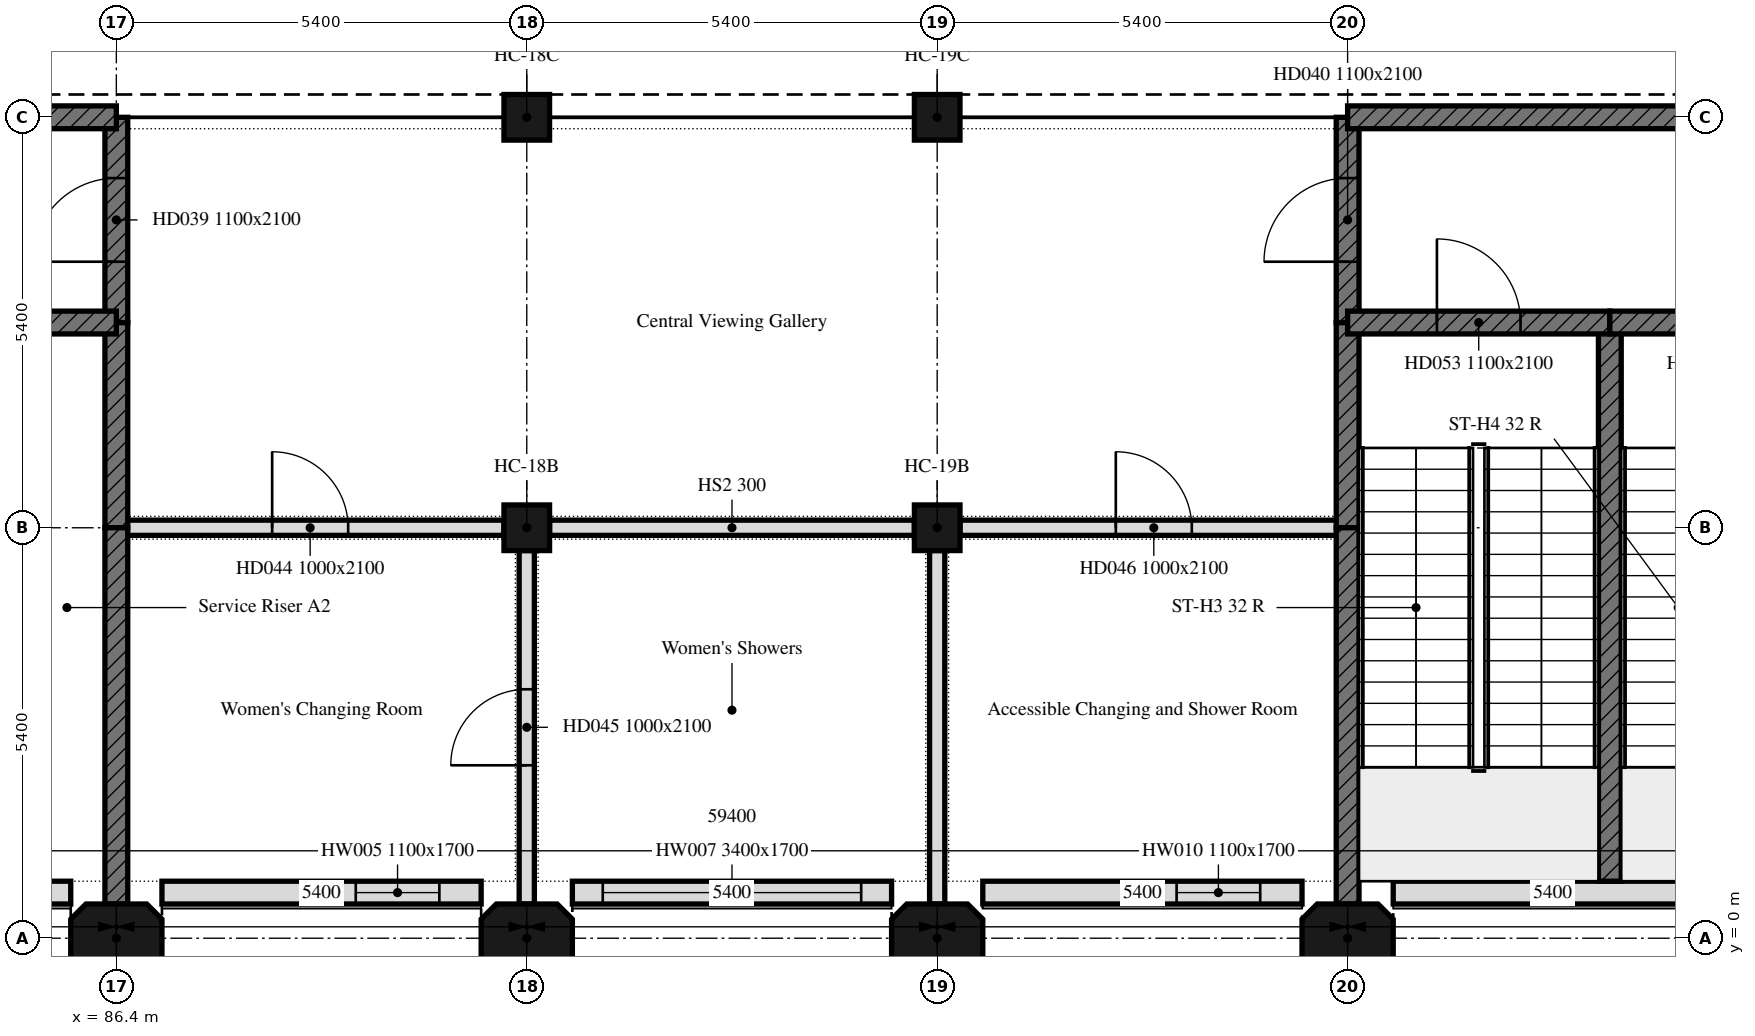
"""IFC4 building model, lengths in metres.
Left out: names, types, materials, properties, quantities, classifications, styles, units other than length and angle.
Written with IfcOpenShell. Run it as: python <this file> out.ifc"""

import sys

from ifc_helpers import new_model, si_unit, direction, frame, frame_2d, origin, origin_2d, place, context, subcontext, project, spatial, polyline, rectangle, outline, extrude, element, fill, save


model = new_model("IFC4")
c1 = context("Model", 3, precision=1e-05, world=origin(), true_north=direction((0.0, 1.0)))
c2 = subcontext(c1, "Body", "Model", "MODEL_VIEW")
j1 = project(units=[si_unit("LENGTHUNIT", "METRE"), si_unit("PLANEANGLEUNIT", "RADIAN")], contexts=[c1])
p1 = place(None, origin())
s1 = spatial("IfcSite", under=j1, at=p1, CompositionType="ELEMENT")
p2 = place(p1, origin())
s2 = spatial("IfcBuilding", under=s1, at=p2, CompositionType="ELEMENT")
p3 = place(p2, frame((0.0, 0.0, 8.4)))
s3 = spatial("IfcBuildingStorey", under=s2, at=p3, CompositionType="ELEMENT", Elevation=8.4)
for number, where, z_axis, x_axis in (
    (1, (86.4, 0.0, 0.0), (0.0, 0.0, 1.0), (1.0, 0.0, 0.0)),
    (2, (91.8, 0.0, 0.0), (0.0, 0.0, 1.0), (1.0, 0.0, 0.0)),
):
    element("IfcColumn", number, at=place(p3, frame(where, z_axis=z_axis, x_axis=x_axis)), inside=s3, PredefinedType="COLUMN", context=c2, shape_type="SweptSolid", body=[
        extrude(outline(polyline([(-0.4, -0.45), (0.4, -0.45), (0.6, -0.25), (0.6, 0.25), (0.4, 0.45), (-0.4, 0.45), (-0.6, 0.25), (-0.6, -0.25), (-0.4, -0.45)])), origin(), (0.0, 0.0, 1.0), 5.7),
    ])
for number, where, z_axis, x_axis in (
    (3, (91.8, 5.4, 0.0), (0.0, 0.0, 1.0), (1.0, 0.0, 0.0)),
    (4, (91.8, 10.8, 0.0), (0.0, 0.0, 1.0), (1.0, 0.0, 0.0)),
):
    element("IfcColumn", number, at=place(p3, frame(where, z_axis=z_axis, x_axis=x_axis)), inside=s3, PredefinedType="COLUMN", context=c2, shape_type="SweptSolid", body=[
        extrude(rectangle(XDim=0.6, YDim=0.6, at=origin_2d()), origin(), (0.0, 0.0, 1.0), 5.7),
    ])
p4 = place(p3, frame((97.2, 0.0, 0.0), z_axis=(0.0, 0.0, 1.0), x_axis=(1.0, 0.0, 0.0)))
e5 = element("IfcColumn", 5, at=p4, inside=s3, PredefinedType="COLUMN", context=c2, shape_type="SweptSolid", body=[
    extrude(outline(polyline([(-0.4, -0.45), (0.4, -0.45), (0.6, -0.25), (0.6, 0.25), (0.4, 0.45), (-0.4, 0.45), (-0.6, 0.25), (-0.6, -0.25), (-0.4, -0.45)])), origin(), (0.0, 0.0, 1.0), 5.7),
])
for number, where, z_axis, x_axis in (
    (6, (97.2, 5.4, 0.0), (0.0, 0.0, 1.0), (1.0, 0.0, 0.0)),
    (7, (97.2, 10.8, 0.0), (0.0, 0.0, 1.0), (1.0, 0.0, 0.0)),
):
    element("IfcColumn", number, at=place(p3, frame(where, z_axis=z_axis, x_axis=x_axis)), inside=s3, PredefinedType="COLUMN", context=c2, shape_type="SweptSolid", body=[
        extrude(rectangle(XDim=0.6, YDim=0.6, at=origin_2d()), origin(), (0.0, 0.0, 1.0), 5.7),
    ])
p5 = place(p3, frame((102.6, 0.0, 0.0), z_axis=(0.0, 0.0, 1.0), x_axis=(1.0, 0.0, 0.0)))
e8 = element("IfcColumn", 8, at=p5, inside=s3, PredefinedType="COLUMN", context=c2, shape_type="SweptSolid", body=[
    extrude(outline(polyline([(-0.4, -0.45), (0.4, -0.45), (0.6, -0.25), (0.6, 0.25), (0.4, 0.45), (-0.4, 0.45), (-0.6, 0.25), (-0.6, -0.25), (-0.4, -0.45)])), origin(), (0.0, 0.0, 1.0), 5.7),
])
p6 = place(p3, frame((81.6, 0.6, 0.0), z_axis=(0.0, 0.0, 1.0), x_axis=(1.0, 0.0, 0.0)))
e9 = element("IfcWall", 9, at=p6, inside=s3, PredefinedType="SOLIDWALL", context=c2, shape_type="SweptSolid", body=[
    extrude(rectangle(XDim=4.2, YDim=0.3, at=frame_2d((2.1, 0.0))), origin(), (0.0, 0.0, 1.0), 5.7),
])
p7 = place(p3, frame((87.0, 0.6, 0.0), z_axis=(0.0, 0.0, 1.0), x_axis=(1.0, 0.0, 0.0)))
e10 = element("IfcWall", 10, at=p7, inside=s3, PredefinedType="SOLIDWALL", context=c2, shape_type="SweptSolid", body=[
    extrude(rectangle(XDim=4.2, YDim=0.3, at=frame_2d((2.1, 0.0))), origin(), (0.0, 0.0, 1.0), 5.7),
])
p8 = place(p7, frame((2.55, 0.0, 0.9)))
e11 = element("IfcOpeningElement", 11, at=p8, cuts=e10, PredefinedType="OPENING", context=c2, shape_type="SweptSolid", body=[
    extrude(rectangle(XDim=1.1, YDim=1.7, at=frame_2d((0.55, 0.85))), frame((0.0, 0.15, 0.0), z_axis=(0.0, -1.0, 0.0), x_axis=(1.0, 0.0, 0.0)), (0.0, 0.0, 1.0), 0.3),
])
p9 = place(p3, frame((92.4, 0.6, 0.0), z_axis=(0.0, 0.0, 1.0), x_axis=(1.0, 0.0, 0.0)))
e12 = element("IfcWall", 12, at=p9, inside=s3, PredefinedType="SOLIDWALL", context=c2, shape_type="SweptSolid", body=[
    extrude(rectangle(XDim=4.2, YDim=0.3, at=frame_2d((2.1, 0.0))), origin(), (0.0, 0.0, 1.0), 5.7),
])
p10 = place(p9, frame((0.4, 0.0, 0.9)))
e13 = element("IfcOpeningElement", 13, at=p10, cuts=e12, PredefinedType="OPENING", context=c2, shape_type="SweptSolid", body=[
    extrude(rectangle(XDim=3.4, YDim=1.7, at=frame_2d((1.7, 0.85))), frame((0.0, 0.15, 0.0), z_axis=(0.0, -1.0, 0.0), x_axis=(1.0, 0.0, 0.0)), (0.0, 0.0, 1.0), 0.3),
])
p11 = place(p3, frame((97.8, 0.6, 0.0), z_axis=(0.0, 0.0, 1.0), x_axis=(1.0, 0.0, 0.0)))
e14 = element("IfcWall", 14, at=p11, inside=s3, PredefinedType="SOLIDWALL", context=c2, shape_type="SweptSolid", body=[
    extrude(rectangle(XDim=4.2, YDim=0.3, at=frame_2d((2.1, 0.0))), origin(), (0.0, 0.0, 1.0), 5.7),
])
p12 = place(p11, frame((2.55, 0.0, 0.9)))
e15 = element("IfcOpeningElement", 15, at=p12, cuts=e14, PredefinedType="OPENING", context=c2, shape_type="SweptSolid", body=[
    extrude(rectangle(XDim=1.1, YDim=1.7, at=frame_2d((0.55, 0.85))), frame((0.0, 0.15, 0.0), z_axis=(0.0, -1.0, 0.0), x_axis=(1.0, 0.0, 0.0)), (0.0, 0.0, 1.0), 0.3),
])
p13 = place(p3, frame((103.2, 0.6, 0.0), z_axis=(0.0, 0.0, 1.0), x_axis=(1.0, 0.0, 0.0)))
e16 = element("IfcWall", 16, at=p13, inside=s3, PredefinedType="SOLIDWALL", context=c2, shape_type="SweptSolid", body=[
    extrude(rectangle(XDim=4.2, YDim=0.3, at=frame_2d((2.1, 0.0))), origin(), (0.0, 0.0, 1.0), 5.7),
])
p14 = place(p3, frame((86.4, 5.4, 0.0), z_axis=(0.0, 0.0, 1.0), x_axis=(1.0, 0.0, 0.0)))
e17 = element("IfcWall", 17, at=p14, inside=s3, PredefinedType="PARTITIONING", context=c2, shape_type="SweptSolid", body=[
    extrude(rectangle(XDim=5.1, YDim=0.2, at=frame_2d((2.55, 0.0))), origin(), (0.0, 0.0, 1.0), 5.7),
])
p15 = place(p14, frame((2.05, 0.0, 0.0)))
e18 = element("IfcOpeningElement", 18, at=p15, cuts=e17, PredefinedType="OPENING", context=c2, shape_type="SweptSolid", body=[
    extrude(rectangle(XDim=1.0, YDim=2.1, at=frame_2d((0.5, 1.05))), frame((0.0, 0.1, 0.0), z_axis=(0.0, -1.0, 0.0), x_axis=(1.0, 0.0, 0.0)), (0.0, 0.0, 1.0), 0.2),
])
p16 = place(p3, frame((92.1, 5.4, 0.0), z_axis=(0.0, 0.0, 1.0), x_axis=(1.0, 0.0, 0.0)))
e19 = element("IfcWall", 19, at=p16, inside=s3, PredefinedType="PARTITIONING", context=c2, shape_type="SweptSolid", body=[
    extrude(rectangle(XDim=4.8, YDim=0.2, at=frame_2d((2.4, 0.0))), origin(), (0.0, 0.0, 1.0), 5.7),
])
p17 = place(p3, frame((97.5, 5.4, 0.0), z_axis=(0.0, 0.0, 1.0), x_axis=(1.0, 0.0, 0.0)))
e20 = element("IfcWall", 20, at=p17, inside=s3, PredefinedType="PARTITIONING", context=c2, shape_type="SweptSolid", body=[
    extrude(rectangle(XDim=5.1, YDim=0.2, at=frame_2d((2.55, 0.0))), origin(), (0.0, 0.0, 1.0), 5.7),
])
p18 = place(p17, frame((2.05, 0.0, 0.0)))
e21 = element("IfcOpeningElement", 21, at=p18, cuts=e20, PredefinedType="OPENING", context=c2, shape_type="SweptSolid", body=[
    extrude(rectangle(XDim=1.0, YDim=2.1, at=frame_2d((0.5, 1.05))), frame((0.0, 0.1, 0.0), z_axis=(0.0, -1.0, 0.0), x_axis=(1.0, 0.0, 0.0)), (0.0, 0.0, 1.0), 0.2),
])
p19 = place(p3, frame((86.4, 5.4, 0.0), z_axis=(0.0, 0.0, 1.0), x_axis=(0.0, 1.0, 0.0)))
e22 = element("IfcWall", 22, at=p19, inside=s3, PredefinedType="SHEAR", context=c2, shape_type="SweptSolid", body=[
    extrude(rectangle(XDim=2.7, YDim=0.3, at=frame_2d((1.35, 0.0))), origin(), (0.0, 0.0, 1.0), 5.7),
])
p20 = place(p3, frame((86.4, 8.1, 0.0), z_axis=(0.0, 0.0, 1.0), x_axis=(0.0, 1.0, 0.0)))
e23 = element("IfcWall", 23, at=p20, inside=s3, PredefinedType="SHEAR", context=c2, shape_type="SweptSolid", body=[
    extrude(rectangle(XDim=2.7, YDim=0.3, at=frame_2d((1.35, 0.0))), origin(), (0.0, 0.0, 1.0), 5.7),
])
p21 = place(p20, frame((0.8, 0.0, 0.0)))
e24 = element("IfcOpeningElement", 24, at=p21, cuts=e23, PredefinedType="OPENING", context=c2, shape_type="SweptSolid", body=[
    extrude(rectangle(XDim=1.1, YDim=2.1, at=frame_2d((0.55, 1.05))), frame((0.0, 0.15, 0.0), z_axis=(0.0, -1.0, 0.0), x_axis=(1.0, 0.0, 0.0)), (0.0, 0.0, 1.0), 0.3),
])
p22 = place(p3, frame((102.6, 5.4, 0.0), z_axis=(0.0, 0.0, 1.0), x_axis=(0.0, 1.0, 0.0)))
e25 = element("IfcWall", 25, at=p22, inside=s3, PredefinedType="SHEAR", context=c2, shape_type="SweptSolid", body=[
    extrude(rectangle(XDim=2.7, YDim=0.3, at=frame_2d((1.35, 0.0))), origin(), (0.0, 0.0, 1.0), 5.7),
])
p23 = place(p3, frame((102.6, 8.1, 0.0), z_axis=(0.0, 0.0, 1.0), x_axis=(0.0, 1.0, 0.0)))
e26 = element("IfcWall", 26, at=p23, inside=s3, PredefinedType="SHEAR", context=c2, shape_type="SweptSolid", body=[
    extrude(rectangle(XDim=2.7, YDim=0.3, at=frame_2d((1.35, 0.0))), origin(), (0.0, 0.0, 1.0), 5.7),
])
p24 = place(p23, frame((0.8, 0.0, 0.0)))
e27 = element("IfcOpeningElement", 27, at=p24, cuts=e26, PredefinedType="OPENING", context=c2, shape_type="SweptSolid", body=[
    extrude(rectangle(XDim=1.1, YDim=2.1, at=frame_2d((0.55, 1.05))), frame((0.0, 0.15, 0.0), z_axis=(0.0, -1.0, 0.0), x_axis=(1.0, 0.0, 0.0)), (0.0, 0.0, 1.0), 0.3),
])
p25 = place(p3, frame((91.8, 0.45, 0.0), z_axis=(0.0, 0.0, 1.0), x_axis=(0.0, 1.0, 0.0)))
e28 = element("IfcWall", 28, at=p25, inside=s3, PredefinedType="PARTITIONING", context=c2, shape_type="SweptSolid", body=[
    extrude(rectangle(XDim=4.65, YDim=0.2, at=frame_2d((2.325, 0.0))), origin(), (0.0, 0.0, 1.0), 5.7),
])
p26 = place(p25, frame((1.825, 0.0, 0.0)))
e29 = element("IfcOpeningElement", 29, at=p26, cuts=e28, PredefinedType="OPENING", context=c2, shape_type="SweptSolid", body=[
    extrude(rectangle(XDim=1.0, YDim=2.1, at=frame_2d((0.5, 1.05))), frame((0.0, 0.1, 0.0), z_axis=(0.0, -1.0, 0.0), x_axis=(1.0, 0.0, 0.0)), (0.0, 0.0, 1.0), 0.2),
])
p27 = place(p3, frame((86.4, 0.45, 0.0), z_axis=(0.0, 0.0, 1.0), x_axis=(0.0, 1.0, 0.0)))
e30 = element("IfcWall", 30, at=p27, inside=s3, PredefinedType="SHEAR", context=c2, shape_type="SweptSolid", body=[
    extrude(rectangle(XDim=4.95, YDim=0.3, at=frame_2d((2.475, 0.0))), origin(), (0.0, 0.0, 1.0), 5.7),
])
p28 = place(p3, frame((97.2, 0.45, 0.0), z_axis=(0.0, 0.0, 1.0), x_axis=(0.0, 1.0, 0.0)))
e31 = element("IfcWall", 31, at=p28, inside=s3, PredefinedType="PARTITIONING", context=c2, shape_type="SweptSolid", body=[
    extrude(rectangle(XDim=4.65, YDim=0.2, at=frame_2d((2.325, 0.0))), origin(), (0.0, 0.0, 1.0), 5.7),
])
p29 = place(p3, frame((102.6, 0.45, 0.0), z_axis=(0.0, 0.0, 1.0), x_axis=(0.0, 1.0, 0.0)))
e32 = element("IfcWall", 32, at=p29, inside=s3, PredefinedType="SHEAR", context=c2, shape_type="SweptSolid", body=[
    extrude(rectangle(XDim=4.95, YDim=0.3, at=frame_2d((2.475, 0.0))), origin(), (0.0, 0.0, 1.0), 5.7),
])
p30 = place(p3, frame((85.1, 8.1, 0.0), z_axis=(0.0, 0.0, 1.0), x_axis=(1.0, 0.0, 0.0)))
e33 = element("IfcWall", 33, at=p30, inside=s3, PredefinedType="SHEAR", context=c2, shape_type="SweptSolid", body=[
    extrude(rectangle(XDim=1.3, YDim=0.3, at=frame_2d((0.65, 0.0))), origin(), (0.0, 0.0, 1.0), 5.7),
])
p31 = place(p3, frame((81.0, 10.8, 0.0), z_axis=(0.0, 0.0, 1.0), x_axis=(1.0, 0.0, 0.0)))
e34 = element("IfcWall", 34, at=p31, inside=s3, PredefinedType="SHEAR", context=c2, shape_type="SweptSolid", body=[
    extrude(rectangle(XDim=5.4, YDim=0.3, at=frame_2d((2.7, 0.0))), origin(), (0.0, 0.0, 1.0), 5.7),
])
p32 = place(p3, frame((106.05, 0.75, 0.0), z_axis=(0.0, 0.0, 1.0), x_axis=(0.0, 1.0, 0.0)))
e35 = element("IfcWall", 35, at=p32, inside=s3, PredefinedType="SHEAR", context=c2, shape_type="SweptSolid", body=[
    extrude(rectangle(XDim=7.35, YDim=0.3, at=frame_2d((3.675, 0.0))), origin(), (0.0, 0.0, 1.0), 5.7),
])
p33 = place(p3, frame((102.6, 8.1, 0.0), z_axis=(0.0, 0.0, 1.0), x_axis=(1.0, 0.0, 0.0)))
e36 = element("IfcWall", 36, at=p33, inside=s3, PredefinedType="SHEAR", context=c2, shape_type="SweptSolid", body=[
    extrude(rectangle(XDim=3.45, YDim=0.3, at=frame_2d((1.725, 0.0))), origin(), (0.0, 0.0, 1.0), 5.7),
])
p34 = place(p33, frame((1.175, 0.0, 0.0)))
e37 = element("IfcOpeningElement", 37, at=p34, cuts=e36, PredefinedType="OPENING", context=c2, shape_type="SweptSolid", body=[
    extrude(rectangle(XDim=1.1, YDim=2.1, at=frame_2d((0.55, 1.05))), frame((0.0, 0.15, 0.0), z_axis=(0.0, -1.0, 0.0), x_axis=(1.0, 0.0, 0.0)), (0.0, 0.0, 1.0), 0.3),
])
p35 = place(p3, frame((106.05, 8.1, 0.0), z_axis=(0.0, 0.0, 1.0), x_axis=(1.0, 0.0, 0.0)))
e38 = element("IfcWall", 38, at=p35, inside=s3, PredefinedType="SHEAR", context=c2, shape_type="SweptSolid", body=[
    extrude(rectangle(XDim=3.45, YDim=0.3, at=frame_2d((1.725, 0.0))), origin(), (0.0, 0.0, 1.0), 5.7),
])
p36 = place(p35, frame((1.175, 0.0, 0.0)))
e39 = element("IfcOpeningElement", 39, at=p36, cuts=e38, PredefinedType="OPENING", context=c2, shape_type="SweptSolid", body=[
    extrude(rectangle(XDim=1.1, YDim=2.1, at=frame_2d((0.55, 1.05))), frame((0.0, 0.15, 0.0), z_axis=(0.0, -1.0, 0.0), x_axis=(1.0, 0.0, 0.0)), (0.0, 0.0, 1.0), 0.3),
])
p37 = place(p3, frame((102.6, 10.8, 0.0), z_axis=(0.0, 0.0, 1.0), x_axis=(1.0, 0.0, 0.0)))
e40 = element("IfcWall", 40, at=p37, inside=s3, PredefinedType="SHEAR", context=c2, shape_type="SweptSolid", body=[
    extrude(rectangle(XDim=10.8, YDim=0.3, at=frame_2d((5.4, 0.0))), origin(), (0.0, 0.0, 1.0), 5.7),
])
p38 = place(p8, origin())
e41 = element("IfcWindow", 41, at=p38, inside=s3, PartitioningType="SINGLE_PANEL", PredefinedType="WINDOW", context=c2, shape_type="SweptSolid", body=[
    extrude(rectangle(XDim=1.1, YDim=1.7, at=frame_2d((0.55, 0.85))), frame((0.0, 0.03, 0.0), z_axis=(0.0, -1.0, 0.0), x_axis=(1.0, 0.0, 0.0)), (0.0, 0.0, 1.0), 0.06),
])
fill(e11, e41)
p39 = place(p10, origin())
e42 = element("IfcWindow", 42, at=p39, inside=s3, PartitioningType="SINGLE_PANEL", PredefinedType="WINDOW", context=c2, shape_type="SweptSolid", body=[
    extrude(rectangle(XDim=3.4, YDim=1.7, at=frame_2d((1.7, 0.85))), frame((0.0, 0.03, 0.0), z_axis=(0.0, -1.0, 0.0), x_axis=(1.0, 0.0, 0.0)), (0.0, 0.0, 1.0), 0.06),
])
fill(e13, e42)
p40 = place(p12, origin())
e43 = element("IfcWindow", 43, at=p40, inside=s3, PartitioningType="SINGLE_PANEL", PredefinedType="WINDOW", context=c2, shape_type="SweptSolid", body=[
    extrude(rectangle(XDim=1.1, YDim=1.7, at=frame_2d((0.55, 0.85))), frame((0.0, 0.03, 0.0), z_axis=(0.0, -1.0, 0.0), x_axis=(1.0, 0.0, 0.0)), (0.0, 0.0, 1.0), 0.06),
])
fill(e15, e43)
p41 = place(p21, origin())
e44 = element("IfcDoor", 44, at=p41, inside=s3, OperationType="SINGLE_SWING_LEFT", PredefinedType="DOOR", context=c2, shape_type="SweptSolid", body=[
    extrude(rectangle(XDim=1.1, YDim=2.1, at=frame_2d((0.55, 1.05))), frame((0.0, 0.025, 0.0), z_axis=(0.0, -1.0, 0.0), x_axis=(1.0, 0.0, 0.0)), (0.0, 0.0, 1.0), 0.05),
])
fill(e24, e44)
p42 = place(p24, origin())
e45 = element("IfcDoor", 45, at=p42, inside=s3, OperationType="SINGLE_SWING_LEFT", PredefinedType="DOOR", context=c2, shape_type="SweptSolid", body=[
    extrude(rectangle(XDim=1.1, YDim=2.1, at=frame_2d((0.55, 1.05))), frame((0.0, 0.025, 0.0), z_axis=(0.0, -1.0, 0.0), x_axis=(1.0, 0.0, 0.0)), (0.0, 0.0, 1.0), 0.05),
])
fill(e27, e45)
p43 = place(p15, origin())
e46 = element("IfcDoor", 46, at=p43, inside=s3, OperationType="SINGLE_SWING_LEFT", PredefinedType="DOOR", context=c2, shape_type="SweptSolid", body=[
    extrude(rectangle(XDim=1.0, YDim=2.1, at=frame_2d((0.5, 1.05))), frame((0.0, 0.025, 0.0), z_axis=(0.0, -1.0, 0.0), x_axis=(1.0, 0.0, 0.0)), (0.0, 0.0, 1.0), 0.05),
])
fill(e18, e46)
p44 = place(p26, origin())
e47 = element("IfcDoor", 47, at=p44, inside=s3, OperationType="SINGLE_SWING_LEFT", PredefinedType="DOOR", context=c2, shape_type="SweptSolid", body=[
    extrude(rectangle(XDim=1.0, YDim=2.1, at=frame_2d((0.5, 1.05))), frame((0.0, 0.025, 0.0), z_axis=(0.0, -1.0, 0.0), x_axis=(1.0, 0.0, 0.0)), (0.0, 0.0, 1.0), 0.05),
])
fill(e29, e47)
p45 = place(p18, origin())
e48 = element("IfcDoor", 48, at=p45, inside=s3, OperationType="SINGLE_SWING_LEFT", PredefinedType="DOOR", context=c2, shape_type="SweptSolid", body=[
    extrude(rectangle(XDim=1.0, YDim=2.1, at=frame_2d((0.5, 1.05))), frame((0.0, 0.025, 0.0), z_axis=(0.0, -1.0, 0.0), x_axis=(1.0, 0.0, 0.0)), (0.0, 0.0, 1.0), 0.05),
])
fill(e21, e48)
p46 = place(p34, origin())
e49 = element("IfcDoor", 49, at=p46, inside=s3, OperationType="SINGLE_SWING_LEFT", PredefinedType="DOOR", context=c2, shape_type="SweptSolid", body=[
    extrude(rectangle(XDim=1.1, YDim=2.1, at=frame_2d((0.55, 1.05))), frame((0.0, 0.025, 0.0), z_axis=(0.0, -1.0, 0.0), x_axis=(1.0, 0.0, 0.0)), (0.0, 0.0, 1.0), 0.05),
])
fill(e37, e49)
save(model, sys.argv[1])
